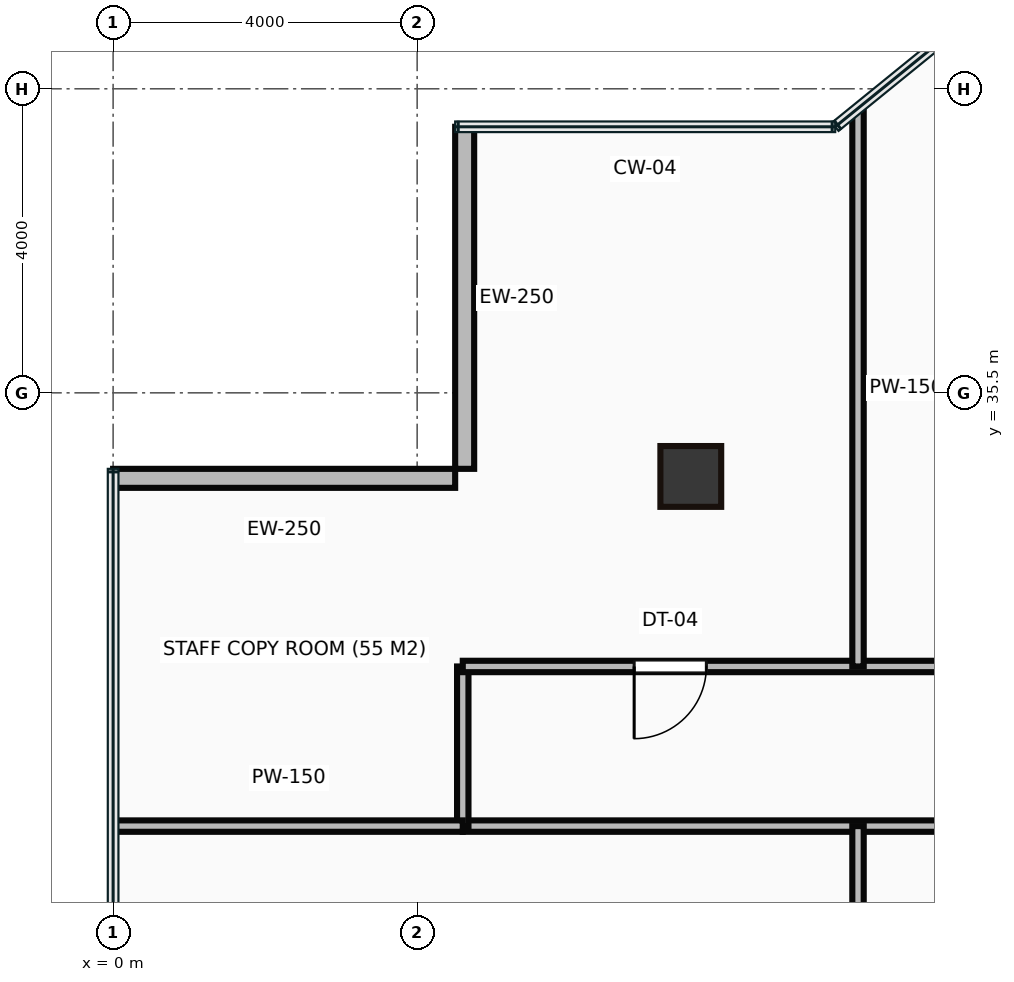
"""IFC4 building model, lengths in metres.
Left out: names, types, materials, properties, quantities, classifications, styles, units other than length and angle.
Written with IfcOpenShell. Run it as: python <this file> out.ifc"""

import sys

from ifc_helpers import new_model, si_unit, direction, frame, frame_2d, origin, origin_2d, place, context, subcontext, project, spatial, rectangle, hollow_rectangle, extrude, source, transform, mapped, element, fill, save


model = new_model("IFC4")
c1 = context("Model", 3, precision=1e-05, world=origin(), true_north=direction((0.0, 1.0)))
c2 = subcontext(c1, "Body", "Model", "MODEL_VIEW")
j1 = project(units=[si_unit("LENGTHUNIT", "METRE"), si_unit("PLANEANGLEUNIT", "RADIAN")], contexts=[c1])
p1 = place(None, origin())
s1 = spatial("IfcSite", under=j1, at=p1, CompositionType="ELEMENT")
p2 = place(p1, origin())
s2 = spatial("IfcBuilding", under=s1, at=p2, CompositionType="ELEMENT")
p3 = place(p2, frame((0.0, 0.0, 103.25)))
s3 = spatial("IfcBuildingStorey", under=s2, at=p3, CompositionType="ELEMENT", Elevation=103.25)
m1 = source(origin(), c2, "Body", "SweptSolid", [
    extrude(hollow_rectangle(XDim=0.8, YDim=0.8, WallThickness=0.04, at=origin_2d()), origin(), (0.0, 0.0, 1.0), 3.65),
])
p4 = place(p3, frame((7.6, 34.4, 0.0), z_axis=(0.0, 0.0, 1.0), x_axis=(1.0, 0.0, 0.0)))
e1 = element("IfcColumn", 1, at=p4, inside=s3, PredefinedType="COLUMN", context=c2, shape_type="MappedRepresentation", body=[
    mapped(m1, transform((0.0, 0.0, 0.0))),
])
m2 = source(origin(), c2, "Body", "SweptSolid", [
    extrude(rectangle(XDim=4.5, YDim=0.25, at=frame_2d((2.25, 0.0))), origin(), (0.0, 0.0, 1.0), 3.4),
])
for number, where, z_axis, x_axis in (
    (2, (4.625, 39.0, 0.0), (0.0, 0.0, 1.0), (0.0, -1.0, 0.0)),
    (3, (4.5, 34.375, 0.0), (0.0, 0.0, 1.0), (-1.0, 0.0, 0.0)),
):
    element("IfcWall", number, at=place(p3, frame(where, z_axis=z_axis, x_axis=x_axis)), inside=s3, PredefinedType="STANDARD", context=c2, shape_type="MappedRepresentation", body=[
        mapped(m2, transform((0.0, 0.0, 0.0))),
    ])
m3 = source(origin(), c2, "Body", "SweptSolid", [
    extrude(rectangle(XDim=32.6, YDim=0.15, at=frame_2d((16.3, 0.0))), origin(), (0.0, 0.0, 1.0), 3.4),
])
p5 = place(p3, frame((37.2, 29.8, 0.0), z_axis=(0.0, 0.0, 1.0), x_axis=(-1.0, 0.0, 0.0)))
e4 = element("IfcWall", 4, at=p5, inside=s3, PredefinedType="PARTITIONING", context=c2, shape_type="MappedRepresentation", body=[
    mapped(m3, transform((0.0, 0.0, 0.0))),
])
p6 = place(p5, frame((22.025, 0.0, 0.0)))
e5 = element("IfcOpeningElement", 5, at=p6, cuts=e4, PredefinedType="OPENING", context=c2, shape_type="SweptSolid", body=[
    extrude(rectangle(XDim=0.95, YDim=2.15, at=frame_2d((0.475, 1.075))), frame((0.0, 0.085, 0.0), z_axis=(0.0, -1.0, 0.0), x_axis=(1.0, 0.0, 0.0)), (0.0, 0.0, 1.0), 0.17),
])
p7 = place(p5, frame((12.025, 0.0, 0.0)))
e6 = element("IfcOpeningElement", 6, at=p7, cuts=e4, PredefinedType="OPENING", context=c2, shape_type="SweptSolid", body=[
    extrude(rectangle(XDim=0.95, YDim=2.15, at=frame_2d((0.475, 1.075))), frame((0.0, 0.085, 0.0), z_axis=(0.0, -1.0, 0.0), x_axis=(1.0, 0.0, 0.0)), (0.0, 0.0, 1.0), 0.17),
])
m4 = source(origin(), c2, "Body", "SweptSolid", [
    extrude(rectangle(XDim=2.1, YDim=0.15, at=frame_2d((1.05, 0.0))), origin(), (0.0, 0.0, 1.0), 3.4),
])
p8 = place(p3, frame((4.6, 29.8, 0.0), z_axis=(0.0, 0.0, 1.0), x_axis=(0.0, 1.0, 0.0)))
e7 = element("IfcWall", 7, at=p8, inside=s3, PredefinedType="PARTITIONING", context=c2, shape_type="MappedRepresentation", body=[
    mapped(m4, transform((0.0, 0.0, 0.0))),
])
m5 = source(origin(), c2, "Body", "SweptSolid", [
    extrude(rectangle(XDim=34.85, YDim=0.15, at=frame_2d((17.425, 0.0))), origin(), (0.0, 0.0, 1.0), 3.4),
])
p9 = place(p3, frame((4.6, 31.9, 0.0), z_axis=(0.0, 0.0, 1.0), x_axis=(1.0, 0.0, 0.0)))
e8 = element("IfcWall", 8, at=p9, inside=s3, PredefinedType="PARTITIONING", context=c2, shape_type="MappedRepresentation", body=[
    mapped(m5, transform((0.0, 0.0, 0.0))),
])
p10 = place(p9, frame((2.255, 0.0, 0.0)))
e9 = element("IfcOpeningElement", 9, at=p10, cuts=e8, PredefinedType="OPENING", context=c2, shape_type="SweptSolid", body=[
    extrude(rectangle(XDim=0.95, YDim=2.15, at=frame_2d((0.475, 1.075))), frame((0.0, 0.085, 0.0), z_axis=(0.0, -1.0, 0.0), x_axis=(1.0, 0.0, 0.0)), (0.0, 0.0, 1.0), 0.17),
])
p11 = place(p9, frame((9.625, 0.0, 0.0)))
e10 = element("IfcOpeningElement", 10, at=p11, cuts=e8, PredefinedType="OPENING", context=c2, shape_type="SweptSolid", body=[
    extrude(rectangle(XDim=0.95, YDim=2.15, at=frame_2d((0.475, 1.075))), frame((0.0, 0.085, 0.0), z_axis=(0.0, -1.0, 0.0), x_axis=(1.0, 0.0, 0.0)), (0.0, 0.0, 1.0), 0.17),
])
p12 = place(p9, frame((19.625, 0.0, 0.0)))
e11 = element("IfcOpeningElement", 11, at=p12, cuts=e8, PredefinedType="OPENING", context=c2, shape_type="SweptSolid", body=[
    extrude(rectangle(XDim=0.95, YDim=2.15, at=frame_2d((0.475, 1.075))), frame((0.0, 0.085, 0.0), z_axis=(0.0, -1.0, 0.0), x_axis=(1.0, 0.0, 0.0)), (0.0, 0.0, 1.0), 0.17),
])
p13 = place(p9, frame((29.42, 0.0, 0.0)))
e12 = element("IfcOpeningElement", 12, at=p13, cuts=e8, PredefinedType="OPENING", context=c2, shape_type="SweptSolid", body=[
    extrude(rectangle(XDim=0.95, YDim=2.15, at=frame_2d((0.475, 1.075))), frame((0.0, 0.085, 0.0), z_axis=(0.0, -1.0, 0.0), x_axis=(1.0, 0.0, 0.0)), (0.0, 0.0, 1.0), 0.17),
])
m6 = source(origin(), c2, "Body", "SweptSolid", [
    extrude(rectangle(XDim=4.58, YDim=0.15, at=frame_2d((2.29, 0.0))), origin(), (0.0, 0.0, 1.0), 3.4),
])
p14 = place(p3, frame((0.02, 29.8, 0.0), z_axis=(0.0, 0.0, 1.0), x_axis=(1.0, 0.0, 0.0)))
e13 = element("IfcWall", 13, at=p14, inside=s3, PredefinedType="PARTITIONING", context=c2, shape_type="MappedRepresentation", body=[
    mapped(m6, transform((0.0, 0.0, 0.0))),
])
m7 = source(origin(), c2, "Body", "SweptSolid", [
    extrude(rectangle(XDim=13.5, YDim=0.15, at=frame_2d((6.75, 0.0))), origin(), (0.0, 0.0, 1.0), 3.4),
])
p15 = place(p3, frame((9.8, 29.8, 0.0), z_axis=(0.0, 0.0, 1.0), x_axis=(0.0, -1.0, 0.0)))
e14 = element("IfcWall", 14, at=p15, inside=s3, PredefinedType="PARTITIONING", context=c2, shape_type="MappedRepresentation", body=[
    mapped(m7, transform((0.0, 0.0, 0.0))),
])
m8 = source(origin(), c2, "Body", "SweptSolid", [
    extrude(rectangle(XDim=7.318, YDim=0.15, at=frame_2d((3.659, 0.0))), origin(), (0.0, 0.0, 1.0), 3.4),
])
p16 = place(p3, frame((9.8, 39.218, 0.0), z_axis=(0.0, 0.0, 1.0), x_axis=(0.0, -1.0, 0.0)))
e15 = element("IfcWall", 15, at=p16, inside=s3, PredefinedType="PARTITIONING", context=c2, shape_type="MappedRepresentation", body=[
    mapped(m8, transform((0.0, 0.0, 0.0))),
])
m9 = source(origin(), c2, "Body", "SweptSolid", [
    extrude(rectangle(XDim=0.95, YDim=2.15, at=frame_2d((0.475, 1.075))), frame((0.0, 0.025, 0.0), z_axis=(0.0, -1.0, 0.0), x_axis=(1.0, 0.0, 0.0)), (0.0, 0.0, 1.0), 0.05),
])
p17 = place(p10, origin())
e16 = element("IfcDoor", 16, at=p17, inside=s3, OperationType="SINGLE_SWING_LEFT", PredefinedType="DOOR", context=c2, shape_type="MappedRepresentation", body=[
    mapped(m9, transform((0.0, 0.0, 0.0))),
])
fill(e9, e16)
save(model, sys.argv[1])
